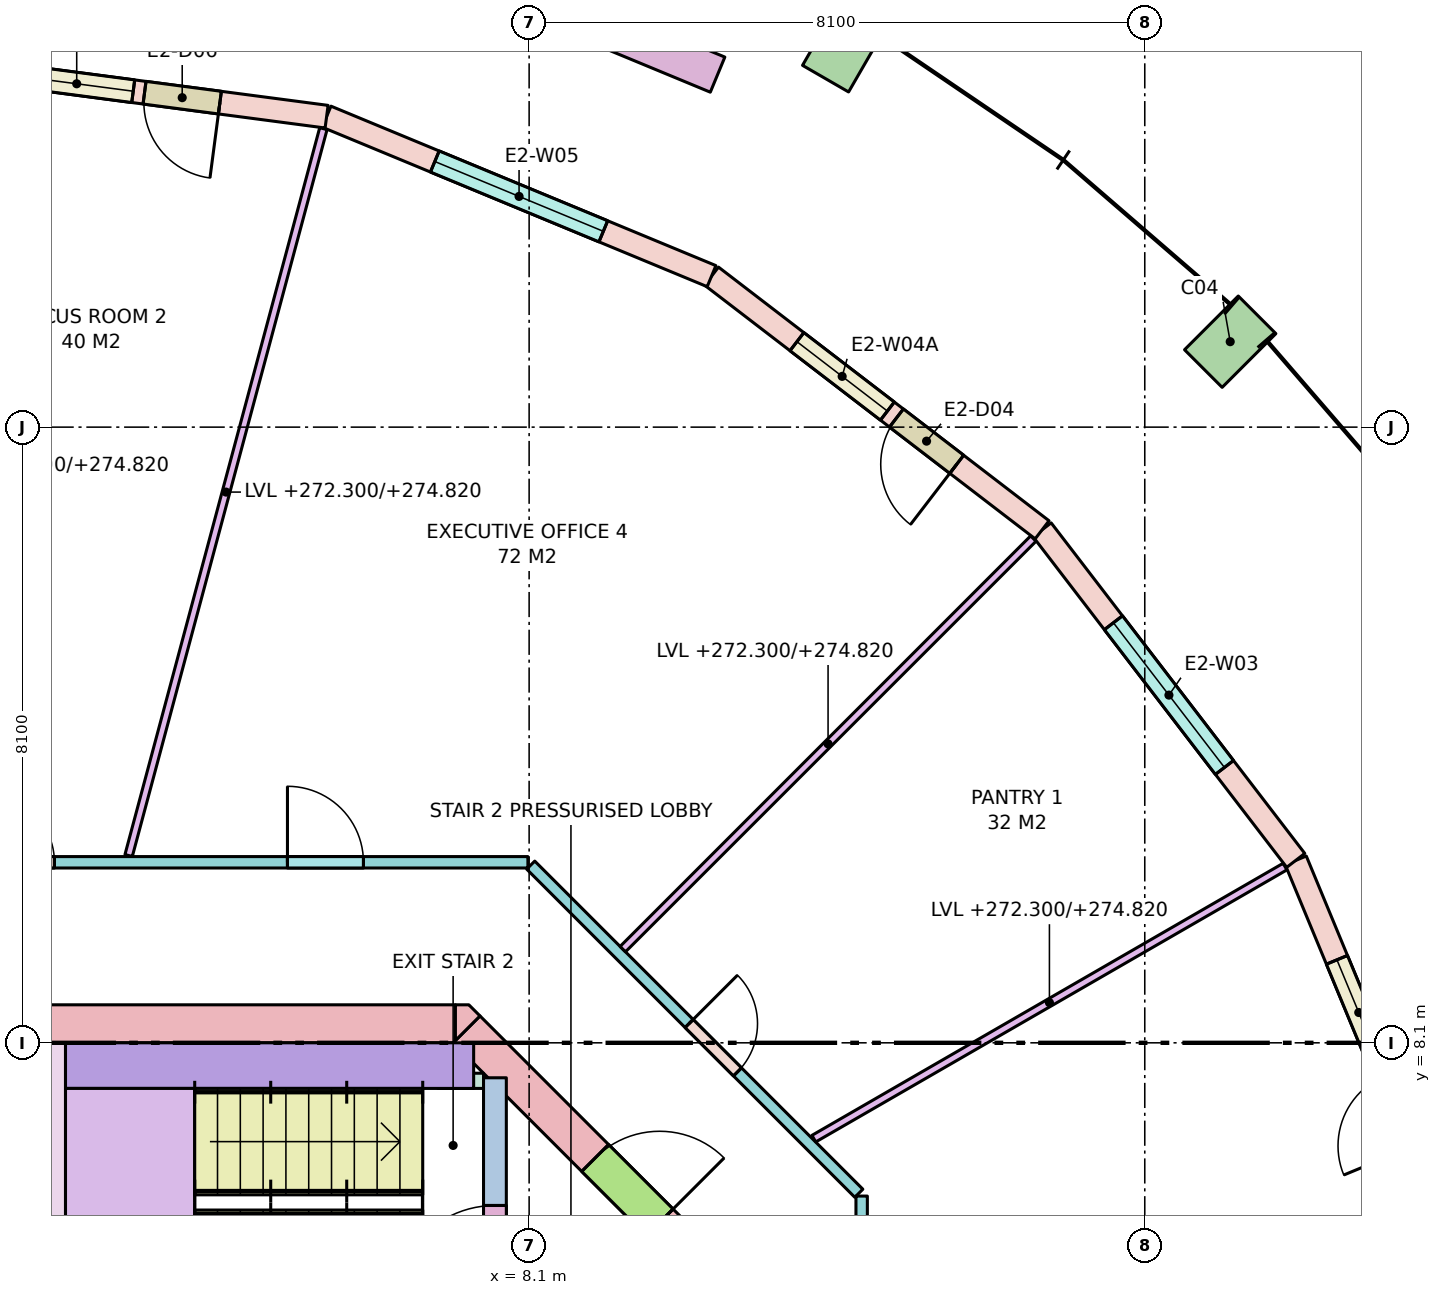
"""IFC4 building model, lengths in metres.
Left out: names, types, materials, properties, quantities, classifications, styles, units other than length and angle.
Written with IfcOpenShell. Run it as: python <this file> out.ifc"""

import sys

from ifc_helpers import new_model, si_unit, direction, frame, frame_2d, origin, origin_2d, place, context, subcontext, project, spatial, polyline, rectangle, outline, extrude, element, fill, save


model = new_model("IFC4")
c1 = context("Model", 3, precision=1e-05, world=origin(), true_north=direction((0.0, 1.0)))
c2 = subcontext(c1, "Body", "Model", "MODEL_VIEW")
j1 = project(units=[si_unit("LENGTHUNIT", "METRE"), si_unit("PLANEANGLEUNIT", "RADIAN")], contexts=[c1])
p1 = place(None, origin())
s1 = spatial("IfcSite", under=j1, at=p1, CompositionType="ELEMENT")
p2 = place(p1, origin())
s2 = spatial("IfcBuilding", under=s1, at=p2, CompositionType="ELEMENT")
p3 = place(p2, frame((0.0, 0.0, 272.3)))
s3 = spatial("IfcBuildingStorey", under=s2, at=p3, CompositionType="ELEMENT", Elevation=272.3)
for number, where, z_axis, x_axis in (
    (1, (17.324, 17.324, 0.0), (0.0, 0.0, 1.0), (-0.707, 0.707, 0.0)),
    (2, (12.25, 21.218, 0.0), (0.0, 0.0, 1.0), (-0.866, 0.5, 0.0)),
):
    element("IfcColumn", number, at=place(p3, frame(where, z_axis=z_axis, x_axis=x_axis)), inside=s3, PredefinedType="COLUMN", context=c2, shape_type="SweptSolid", body=[
        extrude(rectangle(XDim=0.7, YDim=1.0, at=origin_2d()), origin(), (0.0, 0.0, 1.0), 3.7),
    ])
p4 = place(p3, frame((-7.13, 8.35, -0.28), z_axis=(0.0, 0.0, 1.0), x_axis=(1.0, 0.0, 0.0)))
e3 = element("IfcWall", 3, at=p4, inside=s3, PredefinedType="SHEAR", context=c2, shape_type="SweptSolid", body=[
    extrude(rectangle(XDim=14.26, YDim=0.5, at=frame_2d((7.13, 0.0))), origin(), (0.0, 0.0, 1.0), 3.7),
])
p5 = place(p4, frame((5.48, 0.0, 0.28)))
e4 = element("IfcOpeningElement", 4, at=p5, cuts=e3, PredefinedType="OPENING", context=c2, shape_type="SweptSolid", body=[
    extrude(rectangle(XDim=0.7, YDim=2.1, at=frame_2d((0.35, 1.05))), frame((0.0, 0.26, 0.0), z_axis=(0.0, -1.0, 0.0), x_axis=(1.0, 0.0, 0.0)), (0.0, 0.0, 1.0), 0.52),
])
p6 = place(p4, frame((7.155, 0.0, 0.28)))
e5 = element("IfcOpeningElement", 5, at=p6, cuts=e3, PredefinedType="OPENING", context=c2, shape_type="SweptSolid", body=[
    extrude(rectangle(XDim=0.9, YDim=2.1, at=frame_2d((0.45, 1.05))), frame((0.0, 0.26, 0.0), z_axis=(0.0, -1.0, 0.0), x_axis=(1.0, 0.0, 0.0)), (0.0, 0.0, 1.0), 0.52),
])
p7 = place(p3, frame((7.277, 8.277, -0.28), z_axis=(0.0, 0.0, 1.0), x_axis=(0.707106781187, -0.707106781187, 0.0)))
e6 = element("IfcWall", 6, at=p7, inside=s3, PredefinedType="SHEAR", context=c2, shape_type="SweptSolid", body=[
    extrude(rectangle(XDim=4.243, YDim=0.5, at=frame_2d((2.121, 0.0))), origin(), (0.0, 0.0, 1.0), 3.7),
])
p8 = place(p7, frame((2.393, 0.0, 0.28)))
e7 = element("IfcOpeningElement", 7, at=p8, cuts=e6, PredefinedType="OPENING", context=c2, shape_type="SweptSolid", body=[
    extrude(rectangle(XDim=1.2, YDim=2.1, at=frame_2d((0.6, 1.05))), frame((0.0, 0.26, 0.0), z_axis=(0.0, -1.0, 0.0), x_axis=(1.0, 0.0, 0.0)), (0.0, 0.0, 1.0), 0.52),
])
p9 = place(p3, frame((0.0, 0.0, -0.28)))
e8 = element("IfcWall", 8, at=p9, inside=s3, PredefinedType="SHEAR", context=c2, shape_type="SweptSolid", body=[
    extrude(outline(polyline([(7.307, 8.6), (7.454, 8.454), (7.13, 8.13), (7.13, 8.6), (7.307, 8.6)])), origin(), (0.0, 0.0, 1.0), 3.7),
])
p10 = place(p3, frame((1.85, 1.5, 0.0), z_axis=(0.0, 0.0, 1.0), x_axis=(0.0, 1.0, 0.0)))
e9 = element("IfcWall", 9, at=p10, inside=s3, PredefinedType="SHEAR", context=c2, shape_type="SweptSolid", body=[
    extrude(rectangle(XDim=6.6, YDim=0.3, at=frame_2d((3.3, 0.0))), origin(), (0.0, 0.0, 1.0), 3.42),
])
p11 = place(p3, frame((7.65, 4.5, 0.0), z_axis=(0.0, 0.0, 1.0), x_axis=(0.0, 1.0, 0.0)))
e10 = element("IfcWall", 10, at=p11, inside=s3, PredefinedType="SHEAR", context=c2, shape_type="SweptSolid", body=[
    extrude(rectangle(XDim=3.14, YDim=0.3, at=frame_2d((1.57, 0.0))), origin(), (0.0, 0.0, 1.0), 3.42),
])
p12 = place(p11, frame((0.14, 0.0, 0.0)))
e11 = element("IfcOpeningElement", 11, at=p12, cuts=e10, PredefinedType="OPENING", context=c2, shape_type="SweptSolid", body=[
    extrude(rectangle(XDim=1.32, YDim=2.1, at=frame_2d((0.66, 1.05))), frame((0.0, 0.16, 0.0), z_axis=(0.0, -1.0, 0.0), x_axis=(1.0, 0.0, 0.0)), (0.0, 0.0, 1.0), 0.32),
])
p13 = place(p3, frame((2.0, 7.8, 0.0), z_axis=(0.0, 0.0, 1.0), x_axis=(1.0, 0.0, 0.0)))
e12 = element("IfcWall", 12, at=p13, inside=s3, PredefinedType="SHEAR", context=c2, shape_type="SweptSolid", body=[
    extrude(rectangle(XDim=5.37, YDim=0.6, at=frame_2d((2.685, 0.0))), origin(), (0.0, 0.0, 1.0), 3.42),
])
p14 = place(p3, frame((6.9, 7.6, 0.0), z_axis=(0.0, 0.0, 1.0), x_axis=(1.0, 0.0, 0.0)))
e13 = element("IfcWall", 13, at=p14, inside=s3, PredefinedType="SHEAR", context=c2, shape_type="SweptSolid", body=[
    extrude(rectangle(XDim=0.6, YDim=0.2, at=frame_2d((0.3, 0.0))), origin(), (0.0, 0.0, 1.0), 3.42),
])
p15 = place(p3, frame((20.284, 5.435, 0.0), z_axis=(0.0, 0.0, 1.0), x_axis=(-0.382688740813, 0.923877333662, 0.0)))
e14 = element("IfcWall", 14, at=p15, inside=s3, PredefinedType="STANDARD", context=c2, shape_type="SweptSolid", body=[
    extrude(rectangle(XDim=5.482, YDim=0.3, at=frame_2d((2.741, 0.0))), origin(), (0.0, 0.0, 1.0), 3.42),
])
p16 = place(p15, frame((1.416, 0.0, 0.0)))
e15 = element("IfcOpeningElement", 15, at=p16, cuts=e14, PredefinedType="OPENING", context=c2, shape_type="SweptSolid", body=[
    extrude(rectangle(XDim=1.0, YDim=2.4, at=frame_2d((0.5, 1.2))), frame((0.0, 0.16, 0.0), z_axis=(0.0, -1.0, 0.0), x_axis=(1.0, 0.0, 0.0)), (0.0, 0.0, 1.0), 0.32),
])
p17 = place(p15, frame((2.566, 0.0, 0.8)))
e16 = element("IfcOpeningElement", 16, at=p17, cuts=e14, PredefinedType="OPENING", context=c2, shape_type="SweptSolid", body=[
    extrude(rectangle(XDim=1.5, YDim=2.4, at=frame_2d((0.75, 1.2))), frame((0.0, 0.16, 0.0), z_axis=(0.0, -1.0, 0.0), x_axis=(1.0, 0.0, 0.0)), (0.0, 0.0, 1.0), 0.32),
])
p18 = place(p3, frame((18.187, 10.5, 0.0), z_axis=(0.0, 0.0, 1.0), x_axis=(-0.608784891166, 0.793335336593, 0.0)))
e17 = element("IfcWall", 17, at=p18, inside=s3, PredefinedType="STANDARD", context=c2, shape_type="SweptSolid", body=[
    extrude(rectangle(XDim=5.482, YDim=0.3, at=frame_2d((2.741, 0.0))), origin(), (0.0, 0.0, 1.0), 3.42),
])
p19 = place(p18, frame((1.541, 0.0, 0.8)))
e18 = element("IfcOpeningElement", 18, at=p19, cuts=e17, PredefinedType="OPENING", context=c2, shape_type="SweptSolid", body=[
    extrude(rectangle(XDim=2.4, YDim=2.4, at=frame_2d((1.2, 1.2))), frame((0.0, 0.16, 0.0), z_axis=(0.0, -1.0, 0.0), x_axis=(1.0, 0.0, 0.0)), (0.0, 0.0, 1.0), 0.32),
])
p20 = place(p3, frame((14.849, 14.849, 0.0), z_axis=(0.0, 0.0, 1.0), x_axis=(-0.793335336593, 0.608784891166, 0.0)))
e19 = element("IfcWall", 19, at=p20, inside=s3, PredefinedType="STANDARD", context=c2, shape_type="SweptSolid", body=[
    extrude(rectangle(XDim=5.482, YDim=0.3, at=frame_2d((2.741, 0.0))), origin(), (0.0, 0.0, 1.0), 3.42),
])
p21 = place(p20, frame((1.416, 0.0, 0.0)))
e20 = element("IfcOpeningElement", 20, at=p21, cuts=e19, PredefinedType="OPENING", context=c2, shape_type="SweptSolid", body=[
    extrude(rectangle(XDim=1.0, YDim=2.4, at=frame_2d((0.5, 1.2))), frame((0.0, 0.16, 0.0), z_axis=(0.0, -1.0, 0.0), x_axis=(1.0, 0.0, 0.0)), (0.0, 0.0, 1.0), 0.32),
])
p22 = place(p20, frame((2.566, 0.0, 0.8)))
e21 = element("IfcOpeningElement", 21, at=p22, cuts=e19, PredefinedType="OPENING", context=c2, shape_type="SweptSolid", body=[
    extrude(rectangle(XDim=1.5, YDim=2.4, at=frame_2d((0.75, 1.2))), frame((0.0, 0.16, 0.0), z_axis=(0.0, -1.0, 0.0), x_axis=(1.0, 0.0, 0.0)), (0.0, 0.0, 1.0), 0.32),
])
p23 = place(p3, frame((10.5, 18.187, 0.0), z_axis=(0.0, 0.0, 1.0), x_axis=(-0.923877333662, 0.382688740813, 0.0)))
e22 = element("IfcWall", 22, at=p23, inside=s3, PredefinedType="STANDARD", context=c2, shape_type="SweptSolid", body=[
    extrude(rectangle(XDim=5.482, YDim=0.3, at=frame_2d((2.741, 0.0))), origin(), (0.0, 0.0, 1.0), 3.42),
])
p24 = place(p23, frame((1.541, 0.0, 0.8)))
e23 = element("IfcOpeningElement", 23, at=p24, cuts=e22, PredefinedType="OPENING", context=c2, shape_type="SweptSolid", body=[
    extrude(rectangle(XDim=2.4, YDim=2.4, at=frame_2d((1.2, 1.2))), frame((0.0, 0.16, 0.0), z_axis=(0.0, -1.0, 0.0), x_axis=(1.0, 0.0, 0.0)), (0.0, 0.0, 1.0), 0.32),
])
p25 = place(p3, frame((5.435, 20.284, 0.0), z_axis=(0.0, 0.0, 1.0), x_axis=(-0.991444743541, 0.130527087244, 0.0)))
e24 = element("IfcWall", 24, at=p25, inside=s3, PredefinedType="STANDARD", context=c2, shape_type="SweptSolid", body=[
    extrude(rectangle(XDim=5.482, YDim=0.3, at=frame_2d((2.741, 0.0))), origin(), (0.0, 0.0, 1.0), 3.42),
])
p26 = place(p25, frame((1.416, 0.0, 0.0)))
e25 = element("IfcOpeningElement", 25, at=p26, cuts=e24, PredefinedType="OPENING", context=c2, shape_type="SweptSolid", body=[
    extrude(rectangle(XDim=1.0, YDim=2.4, at=frame_2d((0.5, 1.2))), frame((0.0, 0.16, 0.0), z_axis=(0.0, -1.0, 0.0), x_axis=(1.0, 0.0, 0.0)), (0.0, 0.0, 1.0), 0.32),
])
p27 = place(p25, frame((2.566, 0.0, 0.8)))
e26 = element("IfcOpeningElement", 26, at=p27, cuts=e24, PredefinedType="OPENING", context=c2, shape_type="SweptSolid", body=[
    extrude(rectangle(XDim=1.5, YDim=2.4, at=frame_2d((0.75, 1.2))), frame((0.0, 0.16, 0.0), z_axis=(0.0, -1.0, 0.0), x_axis=(1.0, 0.0, 0.0)), (0.0, 0.0, 1.0), 0.32),
])
p28 = place(p3, frame((10.58, 20.838, 0.0), z_axis=(0.0, 0.0, 1.0), x_axis=(-0.923909393783, 0.382611332921, 0.0)))
e27 = element("IfcWall", 27, at=p28, inside=s3, PredefinedType="PARAPET", context=c2, shape_type="SweptSolid", body=[
    extrude(rectangle(XDim=3.6, YDim=0.5, at=frame_2d((1.8, 0.0))), origin(), (0.0, 0.0, 1.0), 0.9),
])
p29 = place(p3, frame((-8.084, 10.475, 0.0), z_axis=(0.0, 0.0, 1.0), x_axis=(1.0, 0.0, 0.0)))
e28 = element("IfcWall", 28, at=p29, inside=s3, PredefinedType="PARTITIONING", context=c2, shape_type="SweptSolid", body=[
    extrude(rectangle(XDim=16.167, YDim=0.15, at=frame_2d((8.084, 0.0))), origin(), (0.0, 0.0, 1.0), 2.52),
])
p30 = place(p29, frame((13.004, 0.0, 0.0)))
e29 = element("IfcOpeningElement", 29, at=p30, cuts=e28, PredefinedType="OPENING", context=c2, shape_type="SweptSolid", body=[
    extrude(rectangle(XDim=1.0, YDim=2.1, at=frame_2d((0.5, 1.05))), frame((0.0, 0.085, 0.0), z_axis=(0.0, -1.0, 0.0), x_axis=(1.0, 0.0, 0.0)), (0.0, 0.0, 1.0), 0.17),
])
p31 = place(p29, frame((9.038, 0.0, 0.0)))
e30 = element("IfcOpeningElement", 30, at=p31, cuts=e28, PredefinedType="OPENING", context=c2, shape_type="SweptSolid", body=[
    extrude(rectangle(XDim=0.9, YDim=2.1, at=frame_2d((0.45, 1.05))), frame((0.0, 0.085, 0.0), z_axis=(0.0, -1.0, 0.0), x_axis=(1.0, 0.0, 0.0)), (0.0, 0.0, 1.0), 0.17),
])
p32 = place(p29, frame((4.556, 0.0, 0.0)))
e31 = element("IfcOpeningElement", 31, at=p32, cuts=e28, PredefinedType="OPENING", context=c2, shape_type="SweptSolid", body=[
    extrude(rectangle(XDim=1.0, YDim=2.1, at=frame_2d((0.5, 1.05))), frame((0.0, 0.085, 0.0), z_axis=(0.0, -1.0, 0.0), x_axis=(1.0, 0.0, 0.0)), (0.0, 0.0, 1.0), 0.17),
])
p33 = place(p3, frame((8.121, 10.438, 0.0), z_axis=(0.0, 0.0, 1.0), x_axis=(0.707106781187, -0.707106781187, 0.0)))
e32 = element("IfcWall", 32, at=p33, inside=s3, PredefinedType="PARTITIONING", context=c2, shape_type="SweptSolid", body=[
    extrude(rectangle(XDim=6.105, YDim=0.15, at=frame_2d((3.053, 0.0))), origin(), (0.0, 0.0, 1.0), 2.52),
])
p34 = place(p33, frame((2.948, 0.0, 0.0)))
e33 = element("IfcOpeningElement", 33, at=p34, cuts=e32, PredefinedType="OPENING", context=c2, shape_type="SweptSolid", body=[
    extrude(rectangle(XDim=0.9, YDim=2.1, at=frame_2d((0.45, 1.05))), frame((0.0, 0.085, 0.0), z_axis=(0.0, -1.0, 0.0), x_axis=(1.0, 0.0, 0.0)), (0.0, 0.0, 1.0), 0.17),
])
p35 = place(p3, frame((12.475, 6.084, 0.0), z_axis=(0.0, 0.0, 1.0), x_axis=(0.0, -1.0, 0.0)))
e34 = element("IfcWall", 34, at=p35, inside=s3, PredefinedType="PARTITIONING", context=c2, shape_type="SweptSolid", body=[
    extrude(rectangle(XDim=12.167, YDim=0.15, at=frame_2d((6.084, 0.0))), origin(), (0.0, 0.0, 1.0), 2.52),
])
p36 = place(p35, frame((7.306, 0.0, 0.0)))
e35 = element("IfcOpeningElement", 35, at=p36, cuts=e34, PredefinedType="OPENING", context=c2, shape_type="SweptSolid", body=[
    extrude(rectangle(XDim=0.9, YDim=2.1, at=frame_2d((0.45, 1.05))), frame((0.0, 0.085, 0.0), z_axis=(0.0, -1.0, 0.0), x_axis=(1.0, 0.0, 0.0)), (0.0, 0.0, 1.0), 0.17),
])
p37 = place(p35, frame((2.567, 0.0, 0.0)))
e36 = element("IfcOpeningElement", 36, at=p37, cuts=e34, PredefinedType="OPENING", context=c2, shape_type="SweptSolid", body=[
    extrude(rectangle(XDim=1.0, YDim=2.1, at=frame_2d((0.5, 1.05))), frame((0.0, 0.085, 0.0), z_axis=(0.0, -1.0, 0.0), x_axis=(1.0, 0.0, 0.0)), (0.0, 0.0, 1.0), 0.17),
])
p38 = place(p3, frame((11.846, 6.839, 0.0), z_axis=(0.0, 0.0, 1.0), x_axis=(0.866011787705, 0.500023583, 0.0)))
e37 = element("IfcWall", 37, at=p38, inside=s3, PredefinedType="PARTITIONING", context=c2, shape_type="SweptSolid", body=[
    extrude(rectangle(XDim=7.158, YDim=0.1, at=frame_2d((3.579, 0.0))), origin(), (0.0, 0.0, 1.0), 2.52),
])
p39 = place(p3, frame((9.333, 9.333, 0.0), z_axis=(0.0, 0.0, 1.0), x_axis=(0.707106781187, 0.707106781187, 0.0)))
e38 = element("IfcWall", 38, at=p39, inside=s3, PredefinedType="PARTITIONING", context=c2, shape_type="SweptSolid", body=[
    extrude(rectangle(XDim=7.639, YDim=0.1, at=frame_2d((3.819, 0.0))), origin(), (0.0, 0.0, 1.0), 2.52),
])
p40 = place(p3, frame((2.831, 10.564, 0.0), z_axis=(0.0, 0.0, 1.0), x_axis=(0.258795254151, 0.965932200741, 0.0)))
e39 = element("IfcWall", 39, at=p40, inside=s3, PredefinedType="PARTITIONING", context=c2, shape_type="SweptSolid", body=[
    extrude(rectangle(XDim=9.9, YDim=0.1, at=frame_2d((4.95, 0.0))), origin(), (0.0, 0.0, 1.0), 2.52),
])
p41 = place(p17, origin())
e40 = element("IfcWindow", 40, at=p41, inside=s3, PartitioningType="SINGLE_PANEL", PredefinedType="WINDOW", context=c2, shape_type="SweptSolid", body=[
    extrude(rectangle(XDim=1.5, YDim=2.4, at=frame_2d((0.75, 1.2))), frame((0.0, 0.03, 0.0), z_axis=(0.0, -1.0, 0.0), x_axis=(1.0, 0.0, 0.0)), (0.0, 0.0, 1.0), 0.06),
])
fill(e16, e40)
p42 = place(p19, origin())
e41 = element("IfcWindow", 41, at=p42, inside=s3, PartitioningType="SINGLE_PANEL", PredefinedType="WINDOW", context=c2, shape_type="SweptSolid", body=[
    extrude(rectangle(XDim=2.4, YDim=2.4, at=frame_2d((1.2, 1.2))), frame((0.0, 0.03, 0.0), z_axis=(0.0, -1.0, 0.0), x_axis=(1.0, 0.0, 0.0)), (0.0, 0.0, 1.0), 0.06),
])
fill(e18, e41)
p43 = place(p21, origin())
e42 = element("IfcDoor", 42, at=p43, inside=s3, OperationType="SINGLE_SWING_LEFT", PredefinedType="DOOR", context=c2, shape_type="SweptSolid", body=[
    extrude(rectangle(XDim=1.0, YDim=2.4, at=frame_2d((0.5, 1.2))), frame((0.0, 0.025, 0.0), z_axis=(0.0, -1.0, 0.0), x_axis=(1.0, 0.0, 0.0)), (0.0, 0.0, 1.0), 0.05),
])
fill(e20, e42)
p44 = place(p22, origin())
e43 = element("IfcWindow", 43, at=p44, inside=s3, PartitioningType="SINGLE_PANEL", PredefinedType="WINDOW", context=c2, shape_type="SweptSolid", body=[
    extrude(rectangle(XDim=1.5, YDim=2.4, at=frame_2d((0.75, 1.2))), frame((0.0, 0.03, 0.0), z_axis=(0.0, -1.0, 0.0), x_axis=(1.0, 0.0, 0.0)), (0.0, 0.0, 1.0), 0.06),
])
fill(e21, e43)
p45 = place(p24, origin())
e44 = element("IfcWindow", 44, at=p45, inside=s3, PartitioningType="SINGLE_PANEL", PredefinedType="WINDOW", context=c2, shape_type="SweptSolid", body=[
    extrude(rectangle(XDim=2.4, YDim=2.4, at=frame_2d((1.2, 1.2))), frame((0.0, 0.03, 0.0), z_axis=(0.0, -1.0, 0.0), x_axis=(1.0, 0.0, 0.0)), (0.0, 0.0, 1.0), 0.06),
])
fill(e23, e44)
p46 = place(p26, origin())
e45 = element("IfcDoor", 45, at=p46, inside=s3, OperationType="SINGLE_SWING_LEFT", PredefinedType="DOOR", context=c2, shape_type="SweptSolid", body=[
    extrude(rectangle(XDim=1.0, YDim=2.4, at=frame_2d((0.5, 1.2))), frame((0.0, 0.025, 0.0), z_axis=(0.0, -1.0, 0.0), x_axis=(1.0, 0.0, 0.0)), (0.0, 0.0, 1.0), 0.05),
])
fill(e25, e45)
p47 = place(p27, origin())
e46 = element("IfcWindow", 46, at=p47, inside=s3, PartitioningType="SINGLE_PANEL", PredefinedType="WINDOW", context=c2, shape_type="SweptSolid", body=[
    extrude(rectangle(XDim=1.5, YDim=2.4, at=frame_2d((0.75, 1.2))), frame((0.0, 0.03, 0.0), z_axis=(0.0, -1.0, 0.0), x_axis=(1.0, 0.0, 0.0)), (0.0, 0.0, 1.0), 0.06),
])
fill(e26, e46)
p48 = place(p12, origin())
e47 = element("IfcDoor", 47, at=p48, inside=s3, OperationType="DOUBLE_DOOR_SINGLE_SWING", PredefinedType="DOOR", context=c2, shape_type="SweptSolid", body=[
    extrude(rectangle(XDim=1.32, YDim=2.1, at=frame_2d((0.66, 1.05))), frame((0.0, 0.025, 0.0), z_axis=(0.0, -1.0, 0.0), x_axis=(1.0, 0.0, 0.0)), (0.0, 0.0, 1.0), 0.05),
])
fill(e11, e47)
p49 = place(p8, origin())
e48 = element("IfcDoor", 48, at=p49, inside=s3, OperationType="SINGLE_SWING_RIGHT", PredefinedType="DOOR", context=c2, shape_type="SweptSolid", body=[
    extrude(rectangle(XDim=1.2, YDim=2.1, at=frame_2d((0.6, 1.05))), frame((0.0, 0.025, 0.0), z_axis=(0.0, -1.0, 0.0), x_axis=(1.0, 0.0, 0.0)), (0.0, 0.0, 1.0), 0.05),
])
fill(e7, e48)
p50 = place(p34, origin())
e49 = element("IfcDoor", 49, at=p50, inside=s3, OperationType="SINGLE_SWING_LEFT", PredefinedType="DOOR", context=c2, shape_type="SweptSolid", body=[
    extrude(rectangle(XDim=0.9, YDim=2.1, at=frame_2d((0.45, 1.05))), frame((0.0, 0.025, 0.0), z_axis=(0.0, -1.0, 0.0), x_axis=(1.0, 0.0, 0.0)), (0.0, 0.0, 1.0), 0.05),
])
fill(e33, e49)
p51 = place(p30, origin())
e50 = element("IfcDoor", 50, at=p51, inside=s3, OperationType="SINGLE_SWING_LEFT", PredefinedType="DOOR", context=c2, shape_type="SweptSolid", body=[
    extrude(rectangle(XDim=1.0, YDim=2.1, at=frame_2d((0.5, 1.05))), frame((0.0, 0.025, 0.0), z_axis=(0.0, -1.0, 0.0), x_axis=(1.0, 0.0, 0.0)), (0.0, 0.0, 1.0), 0.05),
])
fill(e29, e50)
p52 = place(p31, origin())
e51 = element("IfcDoor", 51, at=p52, inside=s3, OperationType="SINGLE_SWING_LEFT", PredefinedType="DOOR", context=c2, shape_type="SweptSolid", body=[
    extrude(rectangle(XDim=0.9, YDim=2.1, at=frame_2d((0.45, 1.05))), frame((0.0, 0.025, 0.0), z_axis=(0.0, -1.0, 0.0), x_axis=(1.0, 0.0, 0.0)), (0.0, 0.0, 1.0), 0.05),
])
fill(e30, e51)
save(model, sys.argv[1])
